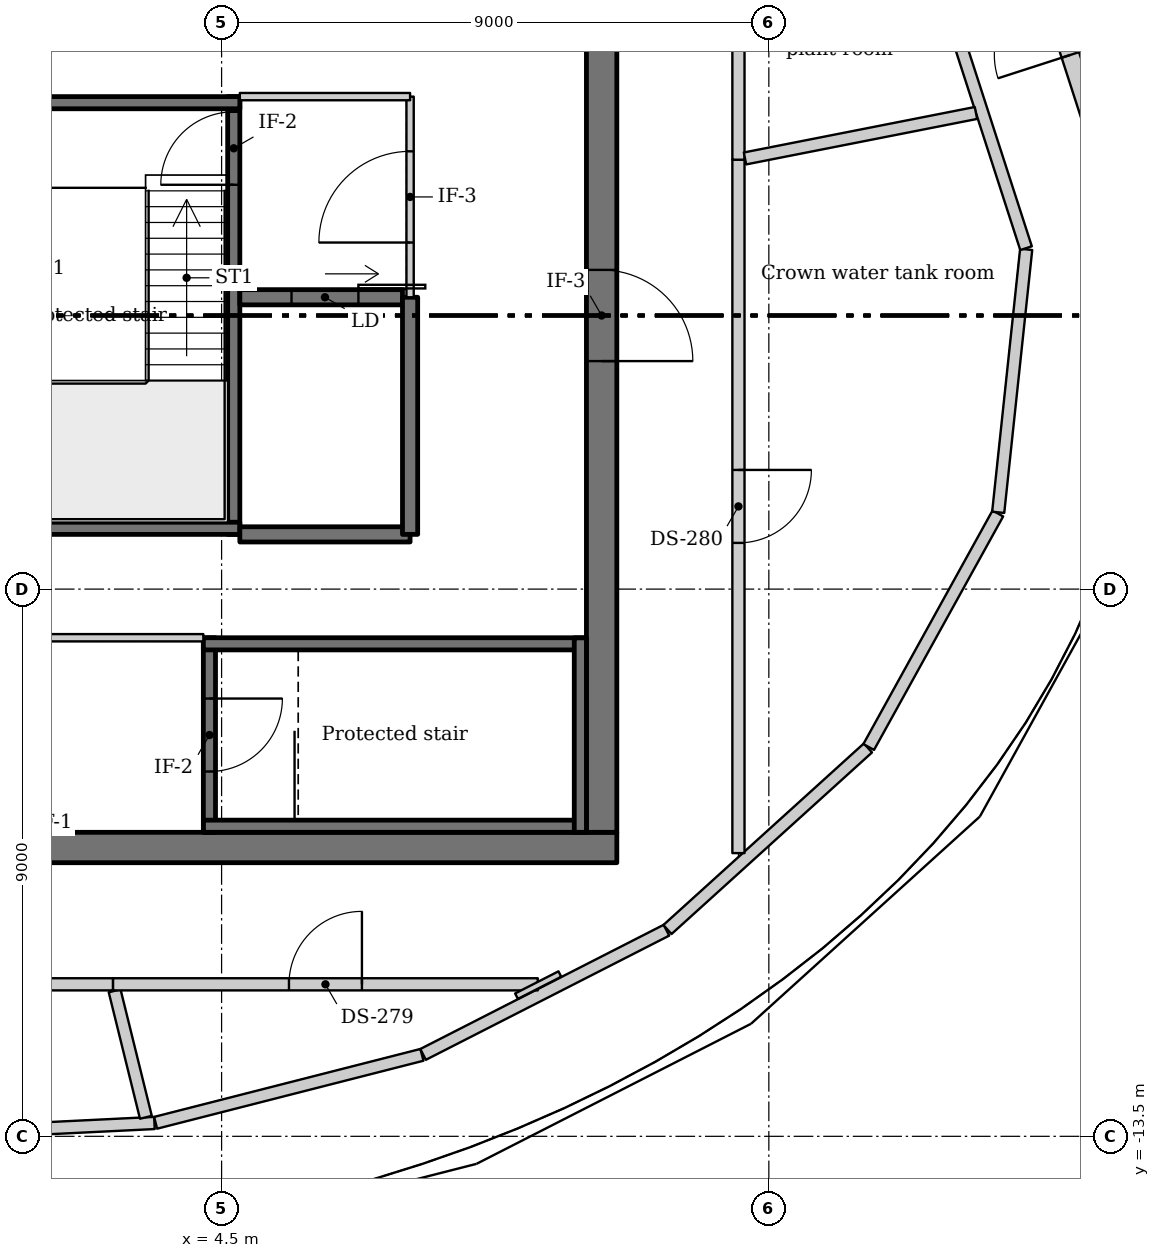
"""IFC4 building model, lengths in metres.
Left out: names, types, materials, properties, quantities, classifications, styles, units other than length and angle.
Written with IfcOpenShell. Run it as: python <this file> out.ifc"""

import sys

from ifc_helpers import new_model, si_unit, direction, frame, frame_2d, origin, place, context, subcontext, project, spatial, rectangle, extrude, source, transform, mapped, element, fill, save


model = new_model("IFC4")
c1 = context("Model", 3, precision=1e-05, world=origin(), true_north=direction((0.0, 1.0)))
c2 = subcontext(c1, "Body", "Model", "MODEL_VIEW")
j1 = project(units=[si_unit("LENGTHUNIT", "METRE"), si_unit("PLANEANGLEUNIT", "RADIAN")], contexts=[c1])
p1 = place(None, origin())
s1 = spatial("IfcSite", under=j1, at=p1, CompositionType="ELEMENT")
p2 = place(p1, origin())
s2 = spatial("IfcBuilding", under=s1, at=p2, CompositionType="ELEMENT")
p3 = place(p2, frame((0.0, 0.0, 352.0)))
s3 = spatial("IfcBuildingStorey", under=s2, at=p3, CompositionType="ELEMENT", Elevation=352.0)
m1 = source(origin(), c2, "Body", "SweptSolid", [
    extrude(rectangle(XDim=22.0, YDim=0.5, at=frame_2d((11.0, 0.0))), origin(), (0.0, 0.0, 1.0), 4.25),
])
p4 = place(p3, frame((-11.0, -8.75, -0.25), z_axis=(0.0, 0.0, 1.0), x_axis=(1.0, 0.0, 0.0)))
e1 = element("IfcWall", 1, at=p4, inside=s3, PredefinedType="SHEAR", context=c2, shape_type="MappedRepresentation", body=[
    mapped(m1, transform((0.0, 0.0, 0.0))),
])
m2 = source(origin(), c2, "Body", "SweptSolid", [
    extrude(rectangle(XDim=1.2, YDim=2.1, at=frame_2d((0.6, 1.05))), frame((0.0, 0.26, 0.0), z_axis=(0.0, -1.0, 0.0), x_axis=(1.0, 0.0, 0.0)), (0.0, 0.0, 1.0), 0.52),
])
p5 = place(p4, frame((9.4, 0.0, 0.25)))
e2 = element("IfcOpeningElement", 2, at=p5, cuts=e1, PredefinedType="OPENING", context=c2, shape_type="MappedRepresentation", body=[
    mapped(m2, transform((0.0, 0.0, 0.0))),
])
p6 = place(p4, frame((11.4, 0.0, 0.25)))
e3 = element("IfcOpeningElement", 3, at=p6, cuts=e1, PredefinedType="OPENING", context=c2, shape_type="MappedRepresentation", body=[
    mapped(m2, transform((0.0, 0.0, 0.0))),
])
m3 = source(origin(), c2, "Body", "SweptSolid", [
    extrude(rectangle(XDim=17.0, YDim=0.5, at=frame_2d((8.5, 0.0))), origin(), (0.0, 0.0, 1.0), 4.25),
])
p7 = place(p3, frame((10.75, -8.5, -0.25), z_axis=(0.0, 0.0, 1.0), x_axis=(0.0, 1.0, 0.0)))
e4 = element("IfcWall", 4, at=p7, inside=s3, PredefinedType="SHEAR", context=c2, shape_type="MappedRepresentation", body=[
    mapped(m3, transform((0.0, 0.0, 0.0))),
])
m4 = source(origin(), c2, "Body", "SweptSolid", [
    extrude(rectangle(XDim=1.5, YDim=2.1, at=frame_2d((0.75, 1.05))), frame((0.0, 0.26, 0.0), z_axis=(0.0, -1.0, 0.0), x_axis=(1.0, 0.0, 0.0)), (0.0, 0.0, 1.0), 0.52),
])
p8 = place(p7, frame((7.75, 0.0, 0.25)))
e5 = element("IfcOpeningElement", 5, at=p8, cuts=e4, PredefinedType="OPENING", context=c2, shape_type="MappedRepresentation", body=[
    mapped(m4, transform((0.0, 0.0, 0.0))),
])
m5 = source(origin(), c2, "Body", "SweptSolid", [
    extrude(rectangle(XDim=4.53, YDim=0.2, at=frame_2d((2.265, 0.0))), origin(), (0.0, 0.0, 1.0), 4.0),
])
p9 = place(p3, frame((3.396, -13.281, 0.0), z_axis=(0.0, 0.0, 1.0), x_axis=(-0.998794180323, -0.049093638625, 0.0)))
e6 = element("IfcWall", 6, at=p9, inside=s3, PredefinedType="SOLIDWALL", context=c2, shape_type="MappedRepresentation", body=[
    mapped(m5, transform((0.0, 0.0, 0.0))),
])
m6 = source(origin(), c2, "Body", "SweptSolid", [
    extrude(rectangle(XDim=4.52, YDim=0.2, at=frame_2d((2.26, 0.0))), origin(), (0.0, 0.0, 1.0), 4.0),
])
p10 = place(p3, frame((7.795, -12.16, 0.0), z_axis=(0.0, 0.0, 1.0), x_axis=(-0.968962042594, -0.247209546764, 0.0)))
e7 = element("IfcWall", 7, at=p10, inside=s3, PredefinedType="SOLIDWALL", context=c2, shape_type="MappedRepresentation", body=[
    mapped(m6, transform((0.0, 0.0, 0.0))),
])
m7 = source(origin(), c2, "Body", "SweptSolid", [
    extrude(rectangle(XDim=4.494, YDim=0.2, at=frame_2d((2.247, 0.0))), origin(), (0.0, 0.0, 1.0), 4.0),
])
p11 = place(p3, frame((11.816, -10.11, 0.0), z_axis=(0.0, 0.0, 1.0), x_axis=(-0.890680163356, -0.45463045059, 0.0)))
e8 = element("IfcWall", 8, at=p11, inside=s3, PredefinedType="SOLIDWALL", context=c2, shape_type="MappedRepresentation", body=[
    mapped(m7, transform((0.0, 0.0, 0.0))),
])
m8 = source(origin(), c2, "Body", "SweptSolid", [
    extrude(rectangle(XDim=4.449, YDim=0.2, at=frame_2d((2.225, 0.0))), origin(), (0.0, 0.0, 1.0), 4.0),
])
p12 = place(p3, frame((15.13, -7.112, 0.0), z_axis=(0.0, 0.0, 1.0), x_axis=(-0.741145642432, -0.671344275841, 0.0)))
e9 = element("IfcWall", 9, at=p12, inside=s3, PredefinedType="SOLIDWALL", context=c2, shape_type="MappedRepresentation", body=[
    mapped(m8, transform((0.0, 0.0, 0.0))),
])
m9 = source(origin(), c2, "Body", "SweptSolid", [
    extrude(rectangle(XDim=4.389, YDim=0.2, at=frame_2d((2.194, 0.0))), origin(), (0.0, 0.0, 1.0), 4.0),
])
p13 = place(p3, frame((17.266, -3.256, 0.0), z_axis=(0.0, 0.0, 1.0), x_axis=(-0.48394176174, -0.875100206402, 0.0)))
e10 = element("IfcWall", 10, at=p13, inside=s3, PredefinedType="SOLIDWALL", context=c2, shape_type="MappedRepresentation", body=[
    mapped(m9, transform((0.0, 0.0, 0.0))),
])
m10 = source(origin(), c2, "Body", "SweptSolid", [
    extrude(rectangle(XDim=4.349, YDim=0.2, at=frame_2d((2.175, 0.0))), origin(), (0.0, 0.0, 1.0), 4.0),
])
p14 = place(p3, frame((17.732, 1.088, 0.0), z_axis=(0.0, 0.0, 1.0), x_axis=(-0.10576007222, -0.994391676918, 0.0)))
e11 = element("IfcWall", 11, at=p14, inside=s3, PredefinedType="SOLIDWALL", context=c2, shape_type="MappedRepresentation", body=[
    mapped(m10, transform((0.0, 0.0, 0.0))),
])
m11 = source(origin(), c2, "Body", "SweptSolid", [
    extrude(rectangle(XDim=4.364, YDim=0.2, at=frame_2d((2.182, 0.0))), origin(), (0.0, 0.0, 1.0), 4.0),
])
p15 = place(p3, frame((16.388, 5.26, 0.0), z_axis=(0.0, 0.0, 1.0), x_axis=(0.307571534743, -0.951524960795, 0.0)))
e12 = element("IfcWall", 12, at=p15, inside=s3, PredefinedType="SOLIDWALL", context=c2, shape_type="MappedRepresentation", body=[
    mapped(m11, transform((0.0, 0.0, 0.0))),
])
m12 = source(origin(), c2, "Body", "SweptSolid", [
    extrude(rectangle(XDim=4.645, YDim=0.3, at=frame_2d((2.322, 0.0))), origin(), (0.0, 0.0, 1.0), 2.6),
])
p16 = place(p3, frame((19.41, 1.341, 0.0), z_axis=(0.0, 0.0, 1.0), x_axis=(-0.307431215292, 0.951570306317, 0.0)))
e13 = element("IfcWall", 13, at=p16, inside=s3, PredefinedType="SOLIDWALL", context=c2, shape_type="MappedRepresentation", body=[
    mapped(m12, transform((0.0, 0.0, 0.0))),
])
m13 = source(origin(), c2, "Body", "SweptSolid", [
    extrude(rectangle(XDim=1.25, YDim=2.3, at=frame_2d((0.625, 1.15))), frame((0.0, 0.16, 0.0), z_axis=(0.0, -1.0, 0.0), x_axis=(1.0, 0.0, 0.0)), (0.0, 0.0, 1.0), 0.32),
])
p17 = place(p16, frame((3.095, 0.0, 0.0)))
e14 = element("IfcOpeningElement", 14, at=p17, cuts=e13, PredefinedType="OPENING", context=c2, shape_type="MappedRepresentation", body=[
    mapped(m13, transform((0.0, 0.0, 0.0))),
])
m14 = source(origin(), c2, "Body", "SweptSolid", [
    extrude(rectangle(XDim=7.2, YDim=0.2, at=frame_2d((3.6, 0.0))), origin(), (0.0, 0.0, 1.0), 4.0),
])
p18 = place(p3, frame((4.7, -3.6, 0.0), z_axis=(0.0, 0.0, 1.0), x_axis=(0.0, 1.0, 0.0)))
e15 = element("IfcWall", 15, at=p18, inside=s3, PredefinedType="SHEAR", context=c2, shape_type="MappedRepresentation", body=[
    mapped(m14, transform((0.0, 0.0, 0.0))),
])
m15 = source(origin(), c2, "Body", "SweptSolid", [
    extrude(rectangle(XDim=1.2, YDim=2.1, at=frame_2d((0.6, 1.05))), frame((0.0, 0.11, 0.0), z_axis=(0.0, -1.0, 0.0), x_axis=(1.0, 0.0, 0.0)), (0.0, 0.0, 1.0), 0.22),
])
p19 = place(p18, frame((5.75, 0.0, 0.0)))
e16 = element("IfcOpeningElement", 16, at=p19, cuts=e15, PredefinedType="OPENING", context=c2, shape_type="MappedRepresentation", body=[
    mapped(m15, transform((0.0, 0.0, 0.0))),
])
m16 = source(origin(), c2, "Body", "SweptSolid", [
    extrude(rectangle(XDim=9.6, YDim=0.2, at=frame_2d((4.8, 0.0))), origin(), (0.0, 0.0, 1.0), 4.0),
])
for number, where, z_axis, x_axis in (
    (17, (-4.8, -3.5, 0.0), (0.0, 0.0, 1.0), (1.0, 0.0, 0.0)),
    (18, (4.8, 3.5, 0.0), (0.0, 0.0, 1.0), (-1.0, 0.0, 0.0)),
):
    element("IfcWall", number, at=place(p3, frame(where, z_axis=z_axis, x_axis=x_axis)), inside=s3, PredefinedType="SHEAR", context=c2, shape_type="MappedRepresentation", body=[
        mapped(m16, transform((0.0, 0.0, 0.0))),
    ])
m17 = source(origin(), c2, "Body", "SweptSolid", [
    extrude(rectangle(XDim=2.675, YDim=0.25, at=frame_2d((1.337, 0.0))), origin(), (0.0, 0.0, 1.0), 4.0),
])
p20 = place(p3, frame((7.475, 0.3, 0.0), z_axis=(0.0, 0.0, 1.0), x_axis=(-1.0, 0.0, 0.0)))
e19 = element("IfcWall", 19, at=p20, inside=s3, PredefinedType="SHEAR", context=c2, shape_type="MappedRepresentation", body=[
    mapped(m17, transform((0.0, 0.0, 0.0))),
])
m18 = source(origin(), c2, "Body", "SweptSolid", [
    extrude(rectangle(XDim=1.1, YDim=2.1, at=frame_2d((0.55, 1.05))), frame((0.0, 0.135, 0.0), z_axis=(0.0, -1.0, 0.0), x_axis=(1.0, 0.0, 0.0)), (0.0, 0.0, 1.0), 0.27),
])
p21 = place(p20, frame((0.725, 0.0, 0.0)))
e20 = element("IfcOpeningElement", 20, at=p21, cuts=e19, PredefinedType="OPENING", context=c2, shape_type="MappedRepresentation", body=[
    mapped(m18, transform((0.0, 0.0, 0.0))),
])
m19 = source(origin(), c2, "Body", "SweptSolid", [
    extrude(rectangle(XDim=2.8, YDim=0.25, at=frame_2d((1.4, 0.0))), origin(), (0.0, 0.0, 1.0), 4.0),
])
p22 = place(p3, frame((4.8, -3.6, 0.0), z_axis=(0.0, 0.0, 1.0), x_axis=(1.0, 0.0, 0.0)))
e21 = element("IfcWall", 21, at=p22, inside=s3, PredefinedType="SHEAR", context=c2, shape_type="MappedRepresentation", body=[
    mapped(m19, transform((0.0, 0.0, 0.0))),
])
m20 = source(origin(), c2, "Body", "SweptSolid", [
    extrude(rectangle(XDim=3.9, YDim=0.25, at=frame_2d((1.95, 0.0))), origin(), (0.0, 0.0, 1.0), 4.0),
])
p23 = place(p3, frame((7.6, -3.6, 0.0), z_axis=(0.0, 0.0, 1.0), x_axis=(0.0, 1.0, 0.0)))
e22 = element("IfcWall", 22, at=p23, inside=s3, PredefinedType="SHEAR", context=c2, shape_type="MappedRepresentation", body=[
    mapped(m20, transform((0.0, 0.0, 0.0))),
])
m21 = source(origin(), c2, "Body", "SweptSolid", [
    extrude(rectangle(XDim=3.3, YDim=0.12, at=frame_2d((1.65, 0.0))), origin(), (0.0, 0.0, 1.0), 3.5),
])
p24 = place(p3, frame((7.6, 0.3, 0.0), z_axis=(0.0, 0.0, 1.0), x_axis=(0.0, 1.0, 0.0)))
e23 = element("IfcWall", 23, at=p24, inside=s3, PredefinedType="PARTITIONING", context=c2, shape_type="MappedRepresentation", body=[
    mapped(m21, transform((0.0, 0.0, 0.0))),
])
m22 = source(origin(), c2, "Body", "SweptSolid", [
    extrude(rectangle(XDim=1.5, YDim=2.1, at=frame_2d((0.75, 1.05))), frame((0.0, 0.07, 0.0), z_axis=(0.0, -1.0, 0.0), x_axis=(1.0, 0.0, 0.0)), (0.0, 0.0, 1.0), 0.14),
])
p25 = place(p24, frame((0.9, 0.0, 0.0)))
e24 = element("IfcOpeningElement", 24, at=p25, cuts=e23, PredefinedType="OPENING", context=c2, shape_type="MappedRepresentation", body=[
    mapped(m22, transform((0.0, 0.0, 0.0))),
])
m23 = source(origin(), c2, "Body", "SweptSolid", [
    extrude(rectangle(XDim=2.8, YDim=0.12, at=frame_2d((1.4, 0.0))), origin(), (0.0, 0.0, 1.0), 3.5),
])
p26 = place(p3, frame((7.6, 3.6, 0.0), z_axis=(0.0, 0.0, 1.0), x_axis=(-1.0, 0.0, 0.0)))
e25 = element("IfcWall", 25, at=p26, inside=s3, PredefinedType="PARTITIONING", context=c2, shape_type="MappedRepresentation", body=[
    mapped(m23, transform((0.0, 0.0, 0.0))),
])
m24 = source(origin(), c2, "Body", "SweptSolid", [
    extrude(rectangle(XDim=8.4, YDim=0.12, at=frame_2d((4.2, 0.0))), origin(), (0.0, 0.0, 1.0), 3.5),
])
p27 = place(p3, frame((4.2, -5.3, 0.0), z_axis=(0.0, 0.0, 1.0), x_axis=(-1.0, 0.0, 0.0)))
e26 = element("IfcWall", 26, at=p27, inside=s3, PredefinedType="PARTITIONING", context=c2, shape_type="MappedRepresentation", body=[
    mapped(m24, transform((0.0, 0.0, 0.0))),
])
m25 = source(origin(), c2, "Body", "SweptSolid", [
    extrude(rectangle(XDim=3.2, YDim=0.2, at=frame_2d((1.6, 0.0))), origin(), (0.0, 0.0, 1.0), 4.0),
])
p28 = place(p3, frame((4.3, -5.3, 0.0), z_axis=(0.0, 0.0, 1.0), x_axis=(0.0, -1.0, 0.0)))
e27 = element("IfcWall", 27, at=p28, inside=s3, PredefinedType="SHEAR", context=c2, shape_type="MappedRepresentation", body=[
    mapped(m25, transform((0.0, 0.0, 0.0))),
])
p29 = place(p28, frame((1.0, 0.0, 0.0)))
e28 = element("IfcOpeningElement", 28, at=p29, cuts=e27, PredefinedType="OPENING", context=c2, shape_type="MappedRepresentation", body=[
    mapped(m15, transform((0.0, 0.0, 0.0))),
])
m26 = source(origin(), c2, "Body", "SweptSolid", [
    extrude(rectangle(XDim=6.3, YDim=0.2, at=frame_2d((3.15, 0.0))), origin(), (0.0, 0.0, 1.0), 4.0),
])
p30 = place(p3, frame((10.5, -5.4, 0.0), z_axis=(0.0, 0.0, 1.0), x_axis=(-1.0, 0.0, 0.0)))
e29 = element("IfcWall", 29, at=p30, inside=s3, PredefinedType="SHEAR", context=c2, shape_type="MappedRepresentation", body=[
    mapped(m26, transform((0.0, 0.0, 0.0))),
])
m27 = source(origin(), c2, "Body", "SweptSolid", [
    extrude(rectangle(XDim=6.298, YDim=0.2, at=frame_2d((3.149, 0.0))), origin(), (0.0, 0.0, 1.0), 4.0),
])
p31 = place(p3, frame((4.202, -8.4, 0.0), z_axis=(0.0, 0.0, 1.0), x_axis=(1.0, 0.0, 0.0)))
e30 = element("IfcWall", 30, at=p31, inside=s3, PredefinedType="SHEAR", context=c2, shape_type="MappedRepresentation", body=[
    mapped(m27, transform((0.0, 0.0, 0.0))),
])
m28 = source(origin(), c2, "Body", "SweptSolid", [
    extrude(rectangle(XDim=3.198, YDim=0.2, at=frame_2d((1.599, 0.0))), origin(), (0.0, 0.0, 1.0), 4.0),
])
p32 = place(p3, frame((10.4, -8.5, 0.0), z_axis=(0.0, 0.0, 1.0), x_axis=(0.0, 1.0, 0.0)))
e31 = element("IfcWall", 31, at=p32, inside=s3, PredefinedType="SHEAR", context=c2, shape_type="MappedRepresentation", body=[
    mapped(m28, transform((0.0, 0.0, 0.0))),
])
m29 = source(origin(), c2, "Body", "SweptSolid", [
    extrude(rectangle(XDim=12.784, YDim=0.2, at=frame_2d((6.392, 0.0))), origin(), (0.0, 0.0, 1.0), 4.0),
])
p33 = place(p3, frame((2.715, -11.0, 0.0), z_axis=(0.0, 0.0, 1.0), x_axis=(-1.0, 0.0, 0.0)))
e32 = element("IfcWall", 32, at=p33, inside=s3, PredefinedType="PARTITIONING", context=c2, shape_type="MappedRepresentation", body=[
    mapped(m29, transform((0.0, 0.0, 0.0))),
])
p34 = place(p33, frame((5.792, 0.0, 0.0)))
e33 = element("IfcOpeningElement", 33, at=p34, cuts=e32, PredefinedType="OPENING", context=c2, shape_type="MappedRepresentation", body=[
    mapped(m15, transform((0.0, 0.0, 0.0))),
])
m30 = source(origin(), c2, "Body", "SweptSolid", [
    extrude(rectangle(XDim=2.143, YDim=0.2, at=frame_2d((1.071, 0.0))), origin(), (0.0, 0.0, 1.0), 4.0),
])
p35 = place(p3, frame((2.741, -11.107, 0.0), z_axis=(0.0, 0.0, 1.0), x_axis=(0.239853646519, -0.970809058596, 0.0)))
e34 = element("IfcWall", 34, at=p35, inside=s3, PredefinedType="PARTITIONING", context=c2, shape_type="MappedRepresentation", body=[
    mapped(m30, transform((0.0, 0.0, 0.0))),
])
m31 = source(origin(), c2, "Body", "SweptSolid", [
    extrude(rectangle(XDim=6.985, YDim=0.2, at=frame_2d((3.492, 0.0))), origin(), (0.0, 0.0, 1.0), 4.0),
])
p36 = place(p3, frame((9.7, -11.0, 0.0), z_axis=(0.0, 0.0, 1.0), x_axis=(-1.0, 0.0, 0.0)))
e35 = element("IfcWall", 35, at=p36, inside=s3, PredefinedType="PARTITIONING", context=c2, shape_type="MappedRepresentation", body=[
    mapped(m31, transform((0.0, 0.0, 0.0))),
])
p37 = place(p36, frame((2.892, 0.0, 0.0)))
e36 = element("IfcOpeningElement", 36, at=p37, cuts=e35, PredefinedType="OPENING", context=c2, shape_type="MappedRepresentation", body=[
    mapped(m15, transform((0.0, 0.0, 0.0))),
])
m32 = source(origin(), c2, "Body", "SweptSolid", [
    extrude(rectangle(XDim=11.404, YDim=0.2, at=frame_2d((5.702, 0.0))), origin(), (0.0, 0.0, 1.0), 4.0),
])
p38 = place(p3, frame((13.0, 2.562, 0.0), z_axis=(0.0, 0.0, 1.0), x_axis=(0.0, -1.0, 0.0)))
e37 = element("IfcWall", 37, at=p38, inside=s3, PredefinedType="PARTITIONING", context=c2, shape_type="MappedRepresentation", body=[
    mapped(m32, transform((0.0, 0.0, 0.0))),
])
p39 = place(p38, frame((5.102, 0.0, 0.0)))
e38 = element("IfcOpeningElement", 38, at=p39, cuts=e37, PredefinedType="OPENING", context=c2, shape_type="MappedRepresentation", body=[
    mapped(m15, transform((0.0, 0.0, 0.0))),
])
m33 = source(origin(), c2, "Body", "SweptSolid", [
    extrude(rectangle(XDim=6.446, YDim=0.2, at=frame_2d((3.223, 0.0))), origin(), (0.0, 0.0, 1.0), 4.0),
])
p40 = place(p3, frame((13.0, 9.008, 0.0), z_axis=(0.0, 0.0, 1.0), x_axis=(0.0, -1.0, 0.0)))
e39 = element("IfcWall", 39, at=p40, inside=s3, PredefinedType="PARTITIONING", context=c2, shape_type="MappedRepresentation", body=[
    mapped(m33, transform((0.0, 0.0, 0.0))),
])
p41 = place(p40, frame((2.623, 0.0, 0.0)))
e40 = element("IfcOpeningElement", 40, at=p41, cuts=e39, PredefinedType="OPENING", context=c2, shape_type="MappedRepresentation", body=[
    mapped(m15, transform((0.0, 0.0, 0.0))),
])
m34 = source(origin(), c2, "Body", "SweptSolid", [
    extrude(rectangle(XDim=3.871, YDim=0.2, at=frame_2d((1.936, 0.0))), origin(), (0.0, 0.0, 1.0), 4.0),
])
p42 = place(p3, frame((16.906, 3.331, 0.0), z_axis=(0.0, 0.0, 1.0), x_axis=(-0.981151353157, -0.193240839884, 0.0)))
e41 = element("IfcWall", 41, at=p42, inside=s3, PredefinedType="PARTITIONING", context=c2, shape_type="MappedRepresentation", body=[
    mapped(m34, transform((0.0, 0.0, 0.0))),
])
m35 = source(origin(), c2, "Body", "SweptSolid", [
    extrude(rectangle(XDim=0.801, YDim=0.1, at=frame_2d((0.4, 0.0))), origin(), (0.0, 0.0, 1.0), 4.0),
])
p43 = place(p3, frame((10.063, -10.831, 0.0), z_axis=(0.0, 0.0, 1.0), x_axis=(-0.890613149989, -0.454761714601, 0.0)))
e42 = element("IfcWall", 42, at=p43, inside=s3, PredefinedType="PARTITIONING", context=c2, shape_type="MappedRepresentation", body=[
    mapped(m35, transform((0.0, 0.0, 0.0))),
])
m36 = source(origin(), c2, "Body", "SweptSolid", [
    extrude(rectangle(XDim=1.25, YDim=2.3, at=frame_2d((0.625, 1.15))), frame((0.0, 0.025, 0.0), z_axis=(0.0, -1.0, 0.0), x_axis=(1.0, 0.0, 0.0)), (0.0, 0.0, 1.0), 0.05),
])
p44 = place(p17, origin())
e43 = element("IfcDoor", 43, at=p44, inside=s3, OperationType="SINGLE_SWING_LEFT", PredefinedType="DOOR", context=c2, shape_type="MappedRepresentation", body=[
    mapped(m36, transform((0.0, 0.0, 0.0))),
])
fill(e14, e43)
m37 = source(origin(), c2, "Body", "SweptSolid", [
    extrude(rectangle(XDim=1.1, YDim=2.1, at=frame_2d((0.55, 1.05))), frame((0.0, 0.025, 0.0), z_axis=(0.0, -1.0, 0.0), x_axis=(1.0, 0.0, 0.0)), (0.0, 0.0, 1.0), 0.05),
])
p45 = place(p21, origin())
e44 = element("IfcDoor", 44, at=p45, inside=s3, OperationType="SLIDING_TO_LEFT", PredefinedType="DOOR", context=c2, shape_type="MappedRepresentation", body=[
    mapped(m37, transform((0.0, 0.0, 0.0))),
])
fill(e20, e44)
m38 = source(origin(), c2, "Body", "SweptSolid", [
    extrude(rectangle(XDim=1.2, YDim=2.1, at=frame_2d((0.6, 1.05))), frame((0.0, 0.025, 0.0), z_axis=(0.0, -1.0, 0.0), x_axis=(1.0, 0.0, 0.0)), (0.0, 0.0, 1.0), 0.05),
])
p46 = place(p19, origin())
e45 = element("IfcDoor", 45, at=p46, inside=s3, OperationType="SINGLE_SWING_RIGHT", PredefinedType="DOOR", context=c2, shape_type="MappedRepresentation", body=[
    mapped(m38, transform((0.0, 0.0, 0.0))),
])
fill(e16, e45)
p47 = place(p29, origin())
e46 = element("IfcDoor", 46, at=p47, inside=s3, OperationType="SINGLE_SWING_RIGHT", PredefinedType="DOOR", context=c2, shape_type="MappedRepresentation", body=[
    mapped(m38, transform((0.0, 0.0, 0.0))),
])
fill(e28, e46)
m39 = source(origin(), c2, "Body", "SweptSolid", [
    extrude(rectangle(XDim=1.5, YDim=2.1, at=frame_2d((0.75, 1.05))), frame((0.0, 0.025, 0.0), z_axis=(0.0, -1.0, 0.0), x_axis=(1.0, 0.0, 0.0)), (0.0, 0.0, 1.0), 0.05),
])
p48 = place(p8, origin())
e47 = element("IfcDoor", 47, at=p48, inside=s3, OperationType="DOUBLE_DOOR_SINGLE_SWING", PredefinedType="DOOR", context=c2, shape_type="MappedRepresentation", body=[
    mapped(m39, transform((0.0, 0.0, 0.0))),
])
fill(e5, e47)
p49 = place(p25, origin())
e48 = element("IfcDoor", 48, at=p49, inside=s3, OperationType="DOUBLE_DOOR_SINGLE_SWING", PredefinedType="DOOR", context=c2, shape_type="MappedRepresentation", body=[
    mapped(m39, transform((0.0, 0.0, 0.0))),
])
fill(e24, e48)
m40 = source(origin(), c2, "Body", "SweptSolid", [
    extrude(rectangle(XDim=1.2, YDim=2.1, at=frame_2d((0.6, 1.05))), frame((0.0, 0.025, 0.0), z_axis=(0.0, -1.0, 0.0), x_axis=(1.0, 0.0, 0.0)), (0.0, 0.0, 1.0), 0.05),
])
p50 = place(p37, origin())
e49 = element("IfcDoor", 49, at=p50, inside=s3, OperationType="SINGLE_SWING_LEFT", PredefinedType="DOOR", context=c2, shape_type="MappedRepresentation", body=[
    mapped(m40, transform((0.0, 0.0, 0.0))),
])
fill(e36, e49)
p51 = place(p39, origin())
e50 = element("IfcDoor", 50, at=p51, inside=s3, OperationType="SINGLE_SWING_LEFT", PredefinedType="DOOR", context=c2, shape_type="MappedRepresentation", body=[
    mapped(m40, transform((0.0, 0.0, 0.0))),
])
fill(e38, e50)
save(model, sys.argv[1])
